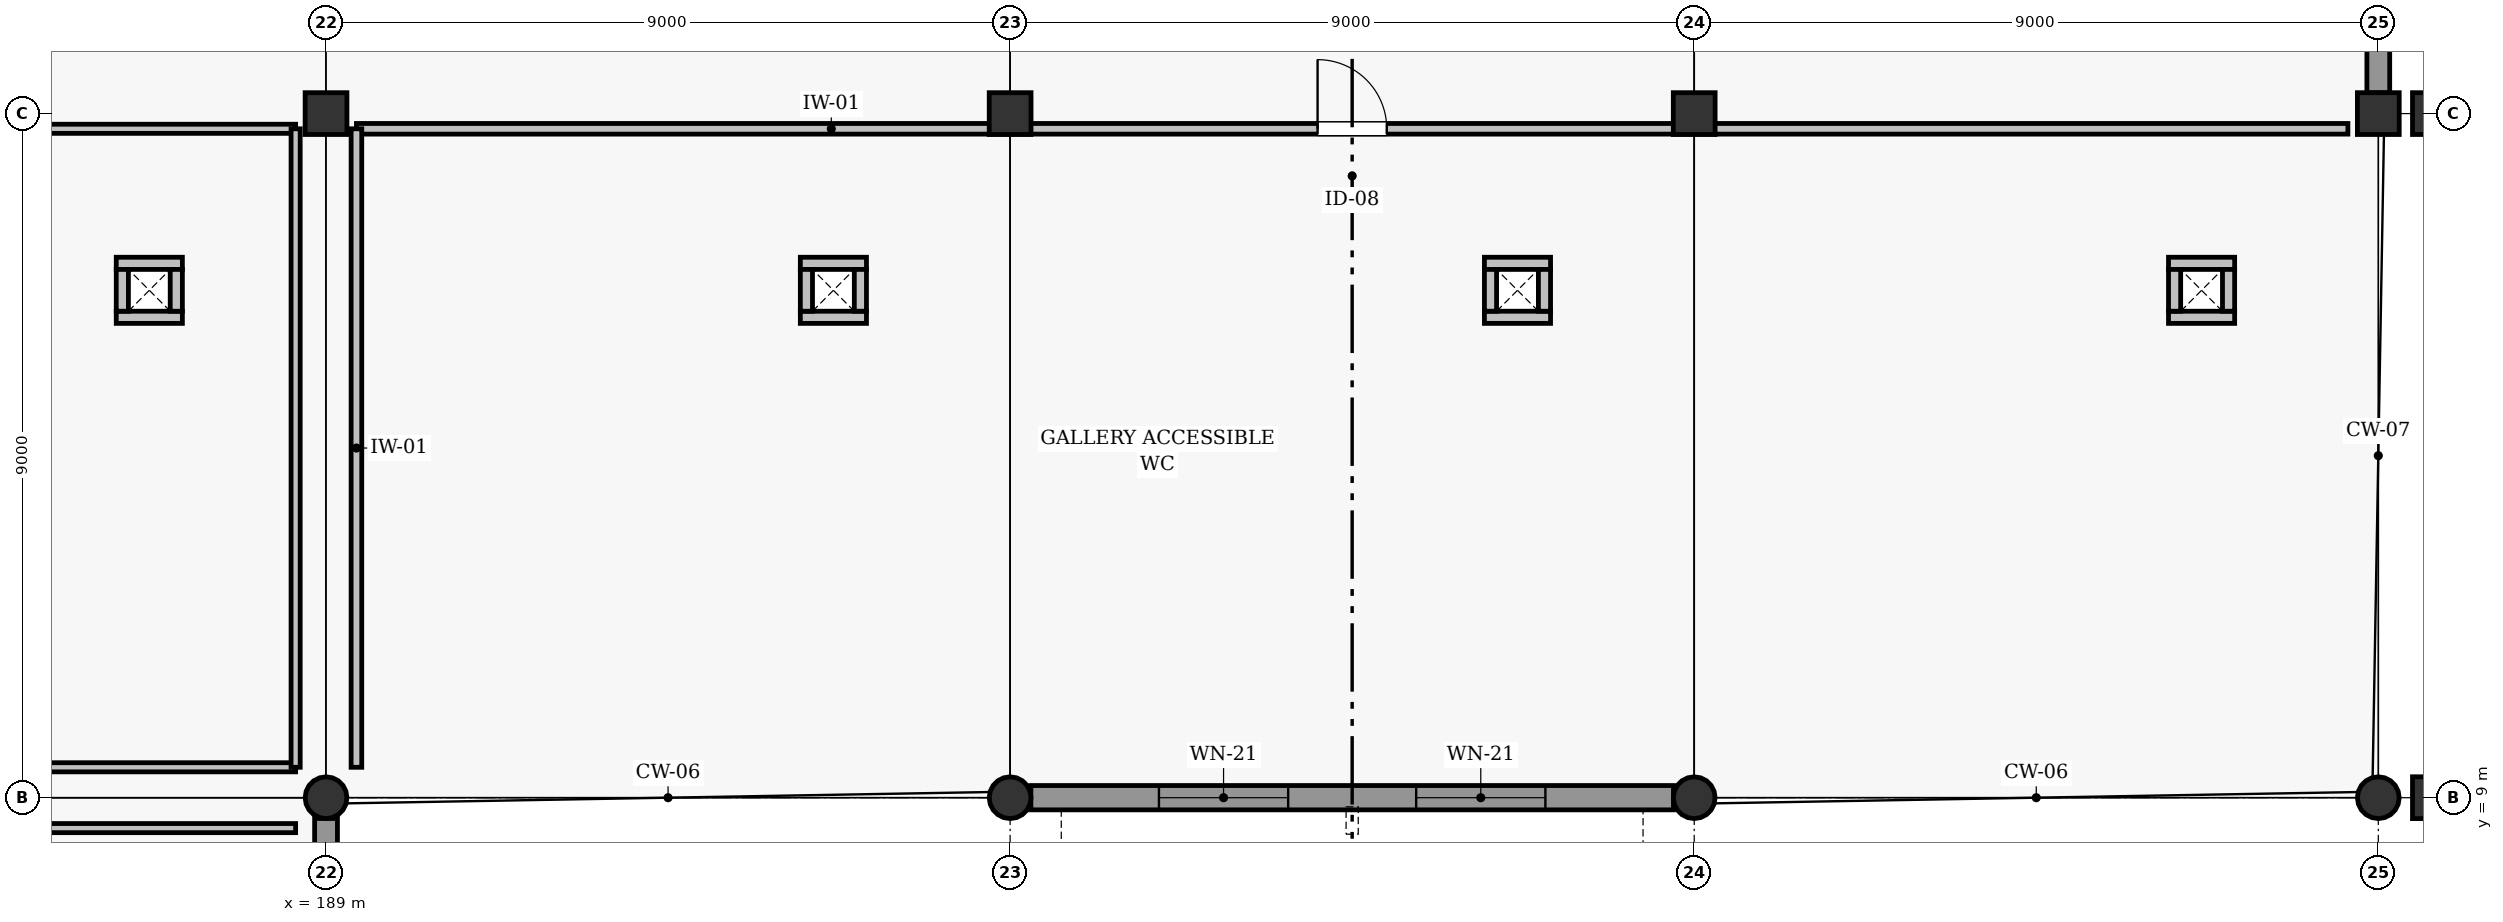
"""IFC4 building model, lengths in metres.
Left out: names, types, materials, properties, quantities, classifications, styles, units other than length and angle.
Written with IfcOpenShell. Run it as: python <this file> out.ifc"""

import sys

from ifc_helpers import new_model, si_unit, direction, frame, frame_2d, origin, origin_2d, place, context, subcontext, project, spatial, rectangle, circle, extrude, element, fill, save


model = new_model("IFC4")
c1 = context("Model", 3, precision=1e-05, world=origin(), true_north=direction((0.0, 1.0)))
c2 = subcontext(c1, "Body", "Model", "MODEL_VIEW")
j1 = project(units=[si_unit("LENGTHUNIT", "METRE"), si_unit("PLANEANGLEUNIT", "RADIAN")], contexts=[c1])
p1 = place(None, origin())
s1 = spatial("IfcSite", under=j1, at=p1, CompositionType="ELEMENT")
p2 = place(p1, origin())
s2 = spatial("IfcBuilding", under=s1, at=p2, CompositionType="ELEMENT")
p3 = place(p2, frame((0.0, 0.0, 4.8)))
s3 = spatial("IfcBuildingStorey", under=s2, at=p3, CompositionType="ELEMENT", Elevation=4.8)
p4 = place(p3, frame((189.0, 9.0, 0.0), z_axis=(0.0, 0.0, 1.0), x_axis=(1.0, 0.0, 0.0)))
e1 = element("IfcColumn", 1, at=p4, inside=s3, PredefinedType="COLUMN", context=c2, shape_type="SweptSolid", body=[
    extrude(circle(Radius=0.275, at=origin_2d()), origin(), (0.0, 0.0, 1.0), 3.6),
])
p5 = place(p3, frame((189.0, 18.0, 0.0), z_axis=(0.0, 0.0, 1.0), x_axis=(1.0, 0.0, 0.0)))
e2 = element("IfcColumn", 2, at=p5, inside=s3, PredefinedType="COLUMN", context=c2, shape_type="SweptSolid", body=[
    extrude(rectangle(XDim=0.55, YDim=0.55, at=origin_2d()), origin(), (0.0, 0.0, 1.0), 3.6),
])
p6 = place(p3, frame((198.0, 9.0, 0.0), z_axis=(0.0, 0.0, 1.0), x_axis=(1.0, 0.0, 0.0)))
e3 = element("IfcColumn", 3, at=p6, inside=s3, PredefinedType="COLUMN", context=c2, shape_type="SweptSolid", body=[
    extrude(circle(Radius=0.275, at=origin_2d()), origin(), (0.0, 0.0, 1.0), 3.6),
])
p7 = place(p3, frame((198.0, 18.0, 0.0), z_axis=(0.0, 0.0, 1.0), x_axis=(1.0, 0.0, 0.0)))
e4 = element("IfcColumn", 4, at=p7, inside=s3, PredefinedType="COLUMN", context=c2, shape_type="SweptSolid", body=[
    extrude(rectangle(XDim=0.55, YDim=0.55, at=origin_2d()), origin(), (0.0, 0.0, 1.0), 3.6),
])
p8 = place(p3, frame((207.0, 9.0, 0.0), z_axis=(0.0, 0.0, 1.0), x_axis=(1.0, 0.0, 0.0)))
e5 = element("IfcColumn", 5, at=p8, inside=s3, PredefinedType="COLUMN", context=c2, shape_type="SweptSolid", body=[
    extrude(circle(Radius=0.275, at=origin_2d()), origin(), (0.0, 0.0, 1.0), 3.6),
])
p9 = place(p3, frame((207.0, 18.0, 0.0), z_axis=(0.0, 0.0, 1.0), x_axis=(1.0, 0.0, 0.0)))
e6 = element("IfcColumn", 6, at=p9, inside=s3, PredefinedType="COLUMN", context=c2, shape_type="SweptSolid", body=[
    extrude(rectangle(XDim=0.55, YDim=0.55, at=origin_2d()), origin(), (0.0, 0.0, 1.0), 3.6),
])
p10 = place(p3, frame((216.0, 9.0, 0.0), z_axis=(0.0, 0.0, 1.0), x_axis=(1.0, 0.0, 0.0)))
e7 = element("IfcColumn", 7, at=p10, inside=s3, PredefinedType="COLUMN", context=c2, shape_type="SweptSolid", body=[
    extrude(circle(Radius=0.275, at=origin_2d()), origin(), (0.0, 0.0, 1.0), 3.6),
])
p11 = place(p3, frame((216.0, 18.0, 0.0), z_axis=(0.0, 0.0, 1.0), x_axis=(1.0, 0.0, 0.0)))
e8 = element("IfcColumn", 8, at=p11, inside=s3, PredefinedType="COLUMN", context=c2, shape_type="SweptSolid", body=[
    extrude(rectangle(XDim=0.55, YDim=0.55, at=origin_2d()), origin(), (0.0, 0.0, 1.0), 3.6),
])
for number, where, z_axis, x_axis in (
    (9, (216.85, 9.0, 0.0), (0.0, 0.0, 1.0), (0.0, 1.0, 0.0)),
    (10, (216.85, 18.0, 0.0), (0.0, 0.0, 1.0), (0.0, 1.0, 0.0)),
):
    element("IfcColumn", number, at=place(p3, frame(where, z_axis=z_axis, x_axis=x_axis)), inside=s3, PredefinedType="PILASTER", context=c2, shape_type="SweptSolid", body=[
        extrude(rectangle(XDim=0.55, YDim=0.8, at=origin_2d()), origin(), (0.0, 0.0, 1.0), 3.6),
    ])
p12 = place(p3, frame((198.273, 9.0, 0.0), z_axis=(0.0, 0.0, 1.0), x_axis=(1.0, 0.0, 0.0)))
e11 = element("IfcWall", 11, at=p12, inside=s3, PredefinedType="SOLIDWALL", context=c2, shape_type="SweptSolid", body=[
    extrude(rectangle(XDim=8.454, YDim=0.32, at=frame_2d((4.227, 0.0))), origin(), (0.0, 0.0, 1.0), 2.702),
])
p13 = place(p12, frame((1.685, 0.0, 0.6)))
e12 = element("IfcOpeningElement", 12, at=p13, cuts=e11, PredefinedType="OPENING", context=c2, shape_type="SweptSolid", body=[
    extrude(rectangle(XDim=1.7, YDim=1.92, at=frame_2d((0.85, 0.96))), frame((0.0, 0.17, 0.0), z_axis=(0.0, -1.0, 0.0), x_axis=(1.0, 0.0, 0.0)), (0.0, 0.0, 1.0), 0.34),
])
p14 = place(p12, frame((5.069, 0.0, 0.6)))
e13 = element("IfcOpeningElement", 13, at=p14, cuts=e11, PredefinedType="OPENING", context=c2, shape_type="SweptSolid", body=[
    extrude(rectangle(XDim=1.7, YDim=1.92, at=frame_2d((0.85, 0.96))), frame((0.0, 0.17, 0.0), z_axis=(0.0, -1.0, 0.0), x_axis=(1.0, 0.0, 0.0)), (0.0, 0.0, 1.0), 0.34),
])
p15 = place(p3, frame((189.0, 0.273, 0.0), z_axis=(0.0, 0.0, 1.0), x_axis=(0.0, 1.0, 0.0)))
e14 = element("IfcWall", 14, at=p15, inside=s3, PredefinedType="SOLIDWALL", context=c2, shape_type="SweptSolid", body=[
    extrude(rectangle(XDim=8.454, YDim=0.3, at=frame_2d((4.227, 0.0))), origin(), (0.0, 0.0, 1.0), 2.702),
])
p16 = place(p15, frame((2.191, 0.0, 0.85)))
e15 = element("IfcOpeningElement", 15, at=p16, cuts=e14, PredefinedType="OPENING", context=c2, shape_type="SweptSolid", body=[
    extrude(rectangle(XDim=0.94, YDim=1.28, at=frame_2d((0.47, 0.64))), frame((0.0, 0.16, 0.0), z_axis=(0.0, -1.0, 0.0), x_axis=(1.0, 0.0, 0.0)), (0.0, 0.0, 1.0), 0.32),
])
p17 = place(p15, frame((5.323, 0.0, 0.85)))
e16 = element("IfcOpeningElement", 16, at=p17, cuts=e14, PredefinedType="OPENING", context=c2, shape_type="SweptSolid", body=[
    extrude(rectangle(XDim=0.94, YDim=1.28, at=frame_2d((0.47, 0.64))), frame((0.0, 0.16, 0.0), z_axis=(0.0, -1.0, 0.0), x_axis=(1.0, 0.0, 0.0)), (0.0, 0.0, 1.0), 0.32),
])
p18 = place(p3, frame((216.0, 18.273, 0.0), z_axis=(0.0, 0.0, 1.0), x_axis=(0.0, 1.0, 0.0)))
e17 = element("IfcWall", 17, at=p18, inside=s3, PredefinedType="SOLIDWALL", context=c2, shape_type="SweptSolid", body=[
    extrude(rectangle(XDim=8.454, YDim=0.3, at=frame_2d((4.227, 0.0))), origin(), (0.0, 0.0, 1.0), 2.702),
])
p19 = place(p18, frame((1.698, 0.0, 0.85)))
e18 = element("IfcOpeningElement", 18, at=p19, cuts=e17, PredefinedType="OPENING", context=c2, shape_type="SweptSolid", body=[
    extrude(rectangle(XDim=1.68, YDim=1.66, at=frame_2d((0.84, 0.83))), frame((0.0, 0.16, 0.0), z_axis=(0.0, -1.0, 0.0), x_axis=(1.0, 0.0, 0.0)), (0.0, 0.0, 1.0), 0.32),
])
p20 = place(p18, frame((5.076, 0.0, 0.85)))
e19 = element("IfcOpeningElement", 19, at=p20, cuts=e17, PredefinedType="OPENING", context=c2, shape_type="SweptSolid", body=[
    extrude(rectangle(XDim=1.68, YDim=1.66, at=frame_2d((0.84, 0.83))), frame((0.0, 0.16, 0.0), z_axis=(0.0, -1.0, 0.0), x_axis=(1.0, 0.0, 0.0)), (0.0, 0.0, 1.0), 0.32),
])
for number, where, z_axis, x_axis in (
    (20, (186.24, 15.32, 0.0), (0.0, 0.0, 1.0), (1.0, 0.0, 0.0)),
    (21, (186.24, 16.03, 0.0), (0.0, 0.0, 1.0), (1.0, 0.0, 0.0)),
):
    element("IfcWall", number, at=place(p3, frame(where, z_axis=z_axis, x_axis=x_axis)), inside=s3, PredefinedType="PARTITIONING", context=c2, shape_type="SweptSolid", body=[
        extrude(rectangle(XDim=0.87, YDim=0.16, at=frame_2d((0.435, 0.0))), origin(), (0.0, 0.0, 1.0), 3.35),
    ])
for number, where, z_axis, x_axis in (
    (22, (186.32, 15.4, 0.0), (0.0, 0.0, 1.0), (0.0, 1.0, 0.0)),
    (23, (187.03, 15.4, 0.0), (0.0, 0.0, 1.0), (0.0, 1.0, 0.0)),
):
    element("IfcWall", number, at=place(p3, frame(where, z_axis=z_axis, x_axis=x_axis)), inside=s3, PredefinedType="PARTITIONING", context=c2, shape_type="SweptSolid", body=[
        extrude(rectangle(XDim=0.55, YDim=0.16, at=frame_2d((0.275, 0.0))), origin(), (0.0, 0.0, 1.0), 3.35),
    ])
for number, where, z_axis, x_axis in (
    (24, (195.24, 15.32, 0.0), (0.0, 0.0, 1.0), (1.0, 0.0, 0.0)),
    (25, (195.24, 16.03, 0.0), (0.0, 0.0, 1.0), (1.0, 0.0, 0.0)),
):
    element("IfcWall", number, at=place(p3, frame(where, z_axis=z_axis, x_axis=x_axis)), inside=s3, PredefinedType="PARTITIONING", context=c2, shape_type="SweptSolid", body=[
        extrude(rectangle(XDim=0.87, YDim=0.16, at=frame_2d((0.435, 0.0))), origin(), (0.0, 0.0, 1.0), 3.35),
    ])
for number, where, z_axis, x_axis in (
    (26, (195.32, 15.4, 0.0), (0.0, 0.0, 1.0), (0.0, 1.0, 0.0)),
    (27, (196.03, 15.4, 0.0), (0.0, 0.0, 1.0), (0.0, 1.0, 0.0)),
):
    element("IfcWall", number, at=place(p3, frame(where, z_axis=z_axis, x_axis=x_axis)), inside=s3, PredefinedType="PARTITIONING", context=c2, shape_type="SweptSolid", body=[
        extrude(rectangle(XDim=0.55, YDim=0.16, at=frame_2d((0.275, 0.0))), origin(), (0.0, 0.0, 1.0), 3.35),
    ])
for number, where, z_axis, x_axis in (
    (28, (204.24, 15.32, 0.0), (0.0, 0.0, 1.0), (1.0, 0.0, 0.0)),
    (29, (204.24, 16.03, 0.0), (0.0, 0.0, 1.0), (1.0, 0.0, 0.0)),
):
    element("IfcWall", number, at=place(p3, frame(where, z_axis=z_axis, x_axis=x_axis)), inside=s3, PredefinedType="PARTITIONING", context=c2, shape_type="SweptSolid", body=[
        extrude(rectangle(XDim=0.87, YDim=0.16, at=frame_2d((0.435, 0.0))), origin(), (0.0, 0.0, 1.0), 3.35),
    ])
for number, where, z_axis, x_axis in (
    (30, (204.32, 15.4, 0.0), (0.0, 0.0, 1.0), (0.0, 1.0, 0.0)),
    (31, (205.03, 15.4, 0.0), (0.0, 0.0, 1.0), (0.0, 1.0, 0.0)),
):
    element("IfcWall", number, at=place(p3, frame(where, z_axis=z_axis, x_axis=x_axis)), inside=s3, PredefinedType="PARTITIONING", context=c2, shape_type="SweptSolid", body=[
        extrude(rectangle(XDim=0.55, YDim=0.16, at=frame_2d((0.275, 0.0))), origin(), (0.0, 0.0, 1.0), 3.35),
    ])
for number, where, z_axis, x_axis in (
    (32, (213.24, 15.32, 0.0), (0.0, 0.0, 1.0), (1.0, 0.0, 0.0)),
    (33, (213.24, 16.03, 0.0), (0.0, 0.0, 1.0), (1.0, 0.0, 0.0)),
):
    element("IfcWall", number, at=place(p3, frame(where, z_axis=z_axis, x_axis=x_axis)), inside=s3, PredefinedType="PARTITIONING", context=c2, shape_type="SweptSolid", body=[
        extrude(rectangle(XDim=0.87, YDim=0.16, at=frame_2d((0.435, 0.0))), origin(), (0.0, 0.0, 1.0), 3.35),
    ])
for number, where, z_axis, x_axis in (
    (34, (213.32, 15.4, 0.0), (0.0, 0.0, 1.0), (0.0, 1.0, 0.0)),
    (35, (214.03, 15.4, 0.0), (0.0, 0.0, 1.0), (0.0, 1.0, 0.0)),
):
    element("IfcWall", number, at=place(p3, frame(where, z_axis=z_axis, x_axis=x_axis)), inside=s3, PredefinedType="PARTITIONING", context=c2, shape_type="SweptSolid", body=[
        extrude(rectangle(XDim=0.55, YDim=0.16, at=frame_2d((0.275, 0.0))), origin(), (0.0, 0.0, 1.0), 3.35),
    ])
p21 = place(p3, frame((135.4, 8.6, 0.0), z_axis=(0.0, 0.0, 1.0), x_axis=(1.0, 0.0, 0.0)))
e36 = element("IfcWall", 36, at=p21, inside=s3, PredefinedType="PARTITIONING", context=c2, shape_type="SweptSolid", body=[
    extrude(rectangle(XDim=53.2, YDim=0.12, at=frame_2d((26.6, 0.0))), origin(), (0.0, 0.0, 1.0), 2.725),
])
p22 = place(p21, frame((21.23, 0.0, 0.0)))
e37 = element("IfcOpeningElement", 37, at=p22, cuts=e36, PredefinedType="OPENING", context=c2, shape_type="SweptSolid", body=[
    extrude(rectangle(XDim=1.74, YDim=2.18, at=frame_2d((0.87, 1.09))), frame((0.0, 0.07, 0.0), z_axis=(0.0, -1.0, 0.0), x_axis=(1.0, 0.0, 0.0)), (0.0, 0.0, 1.0), 0.14),
])
p23 = place(p3, frame((144.4, 9.4, 0.0), z_axis=(0.0, 0.0, 1.0), x_axis=(1.0, 0.0, 0.0)))
e38 = element("IfcWall", 38, at=p23, inside=s3, PredefinedType="PARTITIONING", context=c2, shape_type="SweptSolid", body=[
    extrude(rectangle(XDim=44.2, YDim=0.12, at=frame_2d((22.1, 0.0))), origin(), (0.0, 0.0, 1.0), 2.685),
])
p24 = place(p3, frame((144.4, 17.8, 0.0), z_axis=(0.0, 0.0, 1.0), x_axis=(1.0, 0.0, 0.0)))
e39 = element("IfcWall", 39, at=p24, inside=s3, PredefinedType="PARTITIONING", context=c2, shape_type="SweptSolid", body=[
    extrude(rectangle(XDim=44.2, YDim=0.12, at=frame_2d((22.1, 0.0))), origin(), (0.0, 0.0, 1.0), 2.585),
])
p25 = place(p24, frame((21.29, 0.0, 0.0)))
e40 = element("IfcOpeningElement", 40, at=p25, cuts=e39, PredefinedType="OPENING", context=c2, shape_type="SweptSolid", body=[
    extrude(rectangle(XDim=1.62, YDim=2.14, at=frame_2d((0.81, 1.07))), frame((0.0, 0.07, 0.0), z_axis=(0.0, -1.0, 0.0), x_axis=(1.0, 0.0, 0.0)), (0.0, 0.0, 1.0), 0.14),
])
p26 = place(p3, frame((188.6, 9.4, 0.0), z_axis=(0.0, 0.0, 1.0), x_axis=(0.0, 1.0, 0.0)))
e41 = element("IfcWall", 41, at=p26, inside=s3, PredefinedType="PARTITIONING", context=c2, shape_type="SweptSolid", body=[
    extrude(rectangle(XDim=8.4, YDim=0.12, at=frame_2d((4.2, 0.0))), origin(), (0.0, 0.0, 1.0), 2.585),
])
p27 = place(p3, frame((189.4, 17.8, 0.0), z_axis=(0.0, 0.0, 1.0), x_axis=(1.0, 0.0, 0.0)))
e42 = element("IfcWall", 42, at=p27, inside=s3, PredefinedType="PARTITIONING", context=c2, shape_type="SweptSolid", body=[
    extrude(rectangle(XDim=26.2, YDim=0.14, at=frame_2d((13.1, 0.0))), origin(), (0.0, 0.0, 1.0), 2.705),
])
p28 = place(p27, frame((12.645, 0.0, 0.0)))
e43 = element("IfcOpeningElement", 43, at=p28, cuts=e42, PredefinedType="OPENING", context=c2, shape_type="SweptSolid", body=[
    extrude(rectangle(XDim=0.91, YDim=2.04, at=frame_2d((0.455, 1.02))), frame((0.0, 0.08, 0.0), z_axis=(0.0, -1.0, 0.0), x_axis=(1.0, 0.0, 0.0)), (0.0, 0.0, 1.0), 0.16),
])
p29 = place(p3, frame((189.4, 9.4, 0.0), z_axis=(0.0, 0.0, 1.0), x_axis=(0.0, 1.0, 0.0)))
e44 = element("IfcWall", 44, at=p29, inside=s3, PredefinedType="PARTITIONING", context=c2, shape_type="SweptSolid", body=[
    extrude(rectangle(XDim=8.4, YDim=0.14, at=frame_2d((4.2, 0.0))), origin(), (0.0, 0.0, 1.0), 2.705),
])
p30 = place(p13, origin())
e45 = element("IfcWindow", 45, at=p30, inside=s3, PartitioningType="SINGLE_PANEL", PredefinedType="WINDOW", context=c2, shape_type="SweptSolid", body=[
    extrude(rectangle(XDim=1.7, YDim=1.92, at=frame_2d((0.85, 0.96))), frame((0.0, 0.03, 0.0), z_axis=(0.0, -1.0, 0.0), x_axis=(1.0, 0.0, 0.0)), (0.0, 0.0, 1.0), 0.06),
])
fill(e12, e45)
p31 = place(p14, origin())
e46 = element("IfcWindow", 46, at=p31, inside=s3, PartitioningType="SINGLE_PANEL", PredefinedType="WINDOW", context=c2, shape_type="SweptSolid", body=[
    extrude(rectangle(XDim=1.7, YDim=1.92, at=frame_2d((0.85, 0.96))), frame((0.0, 0.03, 0.0), z_axis=(0.0, -1.0, 0.0), x_axis=(1.0, 0.0, 0.0)), (0.0, 0.0, 1.0), 0.06),
])
fill(e13, e46)
p32 = place(p28, origin())
e47 = element("IfcDoor", 47, at=p32, inside=s3, OperationType="SINGLE_SWING_LEFT", PredefinedType="DOOR", context=c2, shape_type="SweptSolid", body=[
    extrude(rectangle(XDim=0.91, YDim=2.04, at=frame_2d((0.455, 1.02))), frame((0.0, 0.025, 0.0), z_axis=(0.0, -1.0, 0.0), x_axis=(1.0, 0.0, 0.0)), (0.0, 0.0, 1.0), 0.05),
])
fill(e43, e47)
save(model, sys.argv[1])
